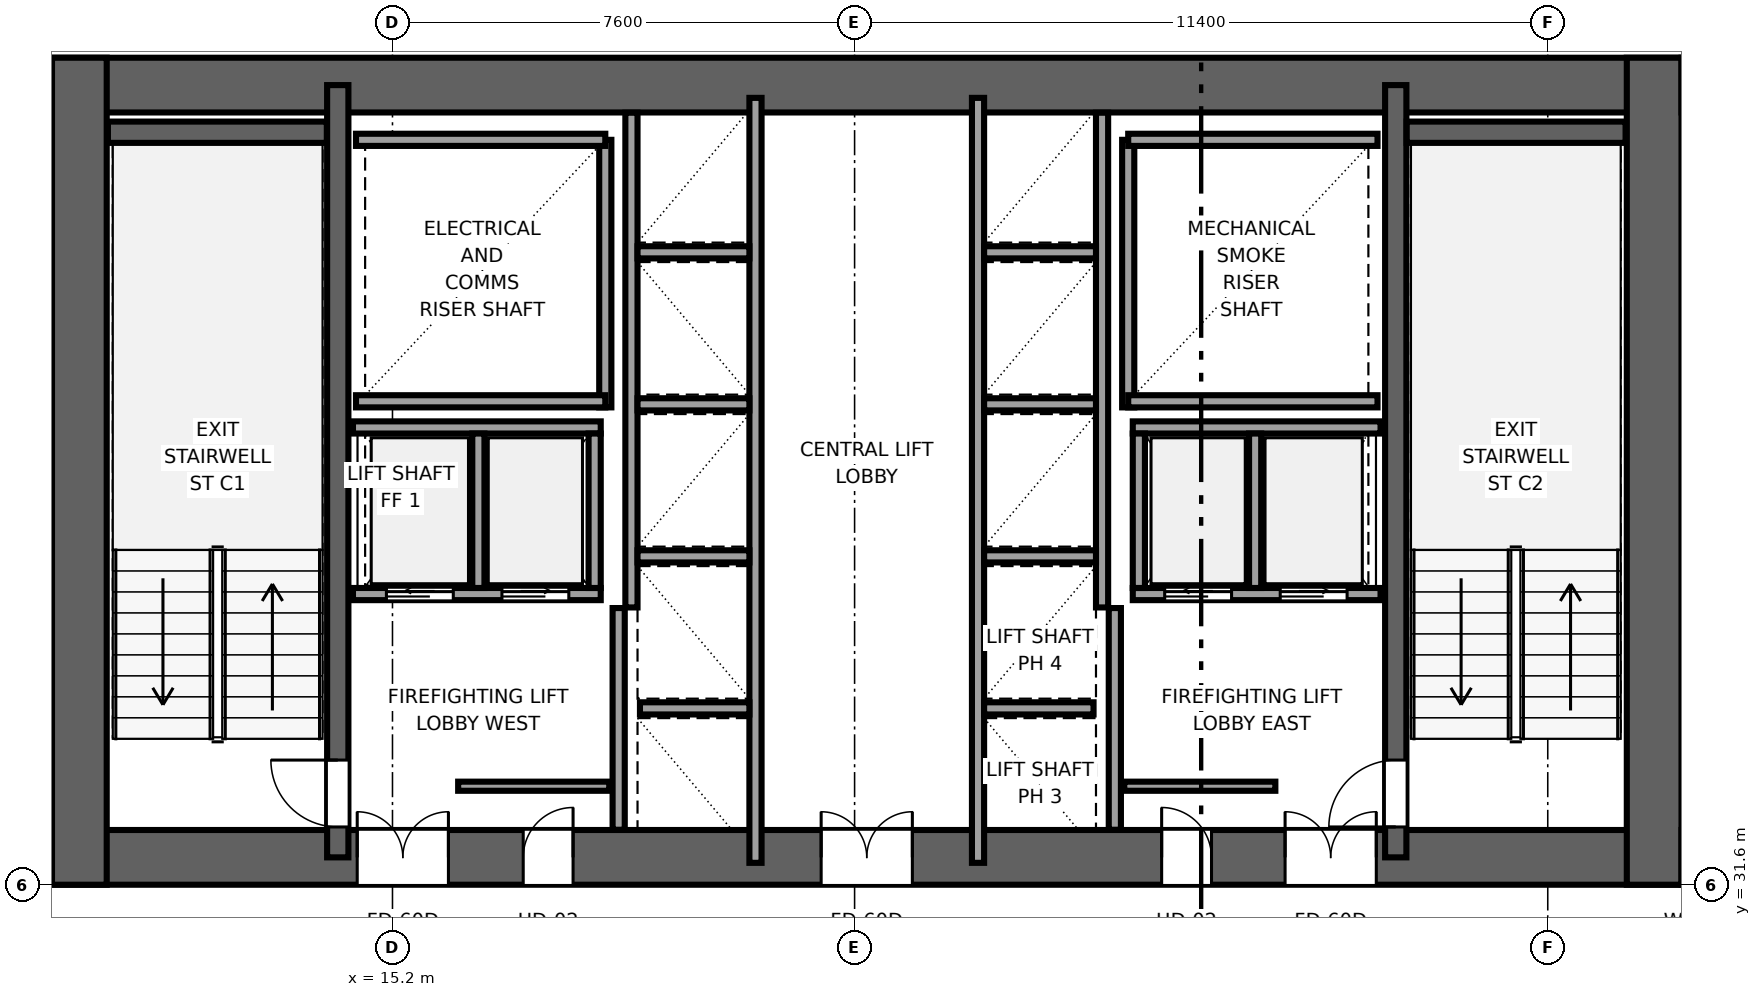
"""IFC4 building model, lengths in metres.
Left out: names, types, materials, properties, quantities, classifications, styles, units other than length and angle.
Written with IfcOpenShell. Run it as: python <this file> out.ifc"""

import sys

from ifc_helpers import new_model, si_unit, direction, frame, frame_2d, origin, place, context, subcontext, project, spatial, rectangle, extrude, source, transform, mapped, element, fill, save


model = new_model("IFC4")
c1 = context("Model", 3, precision=1e-05, world=origin(), true_north=direction((0.0, 1.0)))
c2 = subcontext(c1, "Body", "Model", "MODEL_VIEW")
j1 = project(units=[si_unit("LENGTHUNIT", "METRE"), si_unit("PLANEANGLEUNIT", "RADIAN")], contexts=[c1])
p1 = place(None, origin())
s1 = spatial("IfcSite", under=j1, at=p1, CompositionType="ELEMENT")
p2 = place(p1, origin())
s2 = spatial("IfcBuilding", under=s1, at=p2, CompositionType="ELEMENT")
p3 = place(p2, frame((0.0, 0.0, 39.1)))
s3 = spatial("IfcBuildingStorey", under=s2, at=p3, CompositionType="ELEMENT", Elevation=39.1)
p4 = place(p3, frame((9.6, 32.05, 0.0), z_axis=(0.0, 0.0, 1.0), x_axis=(1.0, 0.0, 0.0)))
e1 = element("IfcWall", 1, at=p4, inside=s3, PredefinedType="SHEAR", context=c2, shape_type="SweptSolid", body=[
    extrude(rectangle(XDim=26.8, YDim=0.9, at=frame_2d((13.4, 0.0))), origin(), (0.0, 0.0, 1.0), 3.55),
])
p5 = place(p4, frame((6.52, 0.0, 0.0), z_axis=(0.0, 0.0, 1.0), x_axis=(-1.0, 0.0, 0.0)))
e2 = element("IfcOpeningElement", 2, at=p5, cuts=e1, PredefinedType="OPENING", context=c2, shape_type="SweptSolid", body=[
    extrude(rectangle(XDim=1.5, YDim=2.04, at=frame_2d((0.75, 1.02))), frame((0.0, 0.46, 0.0), z_axis=(0.0, -1.0, 0.0), x_axis=(1.0, 0.0, 0.0)), (0.0, 0.0, 1.0), 0.92),
])
p6 = place(p4, frame((14.15, 0.0, 0.0), z_axis=(0.0, 0.0, 1.0), x_axis=(-1.0, 0.0, 0.0)))
e3 = element("IfcOpeningElement", 3, at=p6, cuts=e1, PredefinedType="OPENING", context=c2, shape_type="SweptSolid", body=[
    extrude(rectangle(XDim=1.5, YDim=2.04, at=frame_2d((0.75, 1.02))), frame((0.0, 0.46, 0.0), z_axis=(0.0, -1.0, 0.0), x_axis=(1.0, 0.0, 0.0)), (0.0, 0.0, 1.0), 0.92),
])
p7 = place(p4, frame((21.78, 0.0, 0.0), z_axis=(0.0, 0.0, 1.0), x_axis=(-1.0, 0.0, 0.0)))
e4 = element("IfcOpeningElement", 4, at=p7, cuts=e1, PredefinedType="OPENING", context=c2, shape_type="SweptSolid", body=[
    extrude(rectangle(XDim=1.5, YDim=2.04, at=frame_2d((0.75, 1.02))), frame((0.0, 0.46, 0.0), z_axis=(0.0, -1.0, 0.0), x_axis=(1.0, 0.0, 0.0)), (0.0, 0.0, 1.0), 0.92),
])
p8 = place(p4, frame((8.57, 0.0, 0.0), z_axis=(0.0, 0.0, 1.0), x_axis=(-1.0, 0.0, 0.0)))
e5 = element("IfcOpeningElement", 5, at=p8, cuts=e1, PredefinedType="OPENING", context=c2, shape_type="SweptSolid", body=[
    extrude(rectangle(XDim=0.82, YDim=2.01, at=frame_2d((0.41, 1.005))), frame((0.0, 0.46, 0.0), z_axis=(0.0, -1.0, 0.0), x_axis=(1.0, 0.0, 0.0)), (0.0, 0.0, 1.0), 0.92),
])
p9 = place(p4, frame((19.07, 0.0, 0.0), z_axis=(0.0, 0.0, 1.0), x_axis=(-1.0, 0.0, 0.0)))
e6 = element("IfcOpeningElement", 6, at=p9, cuts=e1, PredefinedType="OPENING", context=c2, shape_type="SweptSolid", body=[
    extrude(rectangle(XDim=0.82, YDim=2.01, at=frame_2d((0.41, 1.005))), frame((0.0, 0.46, 0.0), z_axis=(0.0, -1.0, 0.0), x_axis=(1.0, 0.0, 0.0)), (0.0, 0.0, 1.0), 0.92),
])
p10 = place(p3, frame((9.6, 44.75, 0.0), z_axis=(0.0, 0.0, 1.0), x_axis=(1.0, 0.0, 0.0)))
e7 = element("IfcWall", 7, at=p10, inside=s3, PredefinedType="SHEAR", context=c2, shape_type="SweptSolid", body=[
    extrude(rectangle(XDim=26.8, YDim=0.9, at=frame_2d((13.4, 0.0))), origin(), (0.0, 0.0, 1.0), 3.55),
])
for number, where, z_axis, x_axis in (
    (8, (10.05, 31.6, 0.0), (0.0, 0.0, 1.0), (0.0, 1.0, 0.0)),
    (9, (35.95, 31.6, 0.0), (0.0, 0.0, 1.0), (0.0, 1.0, 0.0)),
):
    element("IfcWall", number, at=place(p3, frame(where, z_axis=z_axis, x_axis=x_axis)), inside=s3, PredefinedType="SHEAR", context=c2, shape_type="SweptSolid", body=[
        extrude(rectangle(XDim=13.6, YDim=0.9, at=frame_2d((6.8, 0.0))), origin(), (0.0, 0.0, 1.0), 3.55),
    ])
p11 = place(p3, frame((14.3, 32.05, 0.0), z_axis=(0.0, 0.0, 1.0), x_axis=(0.0, 1.0, 0.0)))
e10 = element("IfcWall", 10, at=p11, inside=s3, PredefinedType="SHEAR", context=c2, shape_type="SweptSolid", body=[
    extrude(rectangle(XDim=12.7, YDim=0.35, at=frame_2d((6.35, 0.0))), origin(), (0.0, 0.0, 1.0), 3.55),
])
p12 = place(p11, frame((0.5, 0.0, 0.0)))
e11 = element("IfcOpeningElement", 11, at=p12, cuts=e10, PredefinedType="OPENING", context=c2, shape_type="SweptSolid", body=[
    extrude(rectangle(XDim=1.1, YDim=2.12, at=frame_2d((0.55, 1.06))), frame((0.0, 0.185, 0.0), z_axis=(0.0, -1.0, 0.0), x_axis=(1.0, 0.0, 0.0)), (0.0, 0.0, 1.0), 0.37),
])
p13 = place(p3, frame((31.7, 32.05, 0.0), z_axis=(0.0, 0.0, 1.0), x_axis=(0.0, 1.0, 0.0)))
e12 = element("IfcWall", 12, at=p13, inside=s3, PredefinedType="SHEAR", context=c2, shape_type="SweptSolid", body=[
    extrude(rectangle(XDim=12.7, YDim=0.35, at=frame_2d((6.35, 0.0))), origin(), (0.0, 0.0, 1.0), 3.55),
])
p14 = place(p13, frame((1.6, 0.0, 0.0), z_axis=(0.0, 0.0, 1.0), x_axis=(-1.0, 0.0, 0.0)))
e13 = element("IfcOpeningElement", 13, at=p14, cuts=e12, PredefinedType="OPENING", context=c2, shape_type="SweptSolid", body=[
    extrude(rectangle(XDim=1.1, YDim=2.12, at=frame_2d((0.55, 1.06))), frame((0.0, 0.185, 0.0), z_axis=(0.0, -1.0, 0.0), x_axis=(1.0, 0.0, 0.0)), (0.0, 0.0, 1.0), 0.37),
])
for number, where, z_axis, x_axis in (
    (14, (10.52, 43.975, 0.0), (0.0, 0.0, 1.0), (1.0, 0.0, 0.0)),
    (15, (31.88, 43.975, 0.0), (0.0, 0.0, 1.0), (1.0, 0.0, 0.0)),
):
    element("IfcWall", number, at=place(p3, frame(where, z_axis=z_axis, x_axis=x_axis)), inside=s3, PredefinedType="SHEAR", context=c2, shape_type="SweptSolid", body=[
        extrude(rectangle(XDim=3.6, YDim=0.35, at=frame_2d((1.8, 0.0))), origin(), (0.0, 0.0, 1.0), 3.55),
    ])
p15 = place(p3, frame((18.7, 39.45, 0.0), z_axis=(0.0, 0.0, 1.0), x_axis=(0.0, 1.0, 0.0)))
e16 = element("IfcWall", 16, at=p15, inside=s3, PredefinedType="SOLIDWALL", context=c2, shape_type="SweptSolid", body=[
    extrude(rectangle(XDim=4.4, YDim=0.2, at=frame_2d((2.2, 0.0))), origin(), (0.0, 0.0, 1.0), 3.37),
])
for number, where, z_axis, x_axis in (
    (17, (14.6, 39.55, 0.0), (0.0, 0.0, 1.0), (1.0, 0.0, 0.0)),
    (18, (14.6, 43.85, 0.0), (0.0, 0.0, 1.0), (1.0, 0.0, 0.0)),
):
    element("IfcWall", number, at=place(p3, frame(where, z_axis=z_axis, x_axis=x_axis)), inside=s3, PredefinedType="SOLIDWALL", context=c2, shape_type="SweptSolid", body=[
        extrude(rectangle(XDim=4.1, YDim=0.2, at=frame_2d((2.05, 0.0))), origin(), (0.0, 0.0, 1.0), 3.37),
    ])
p16 = place(p3, frame((27.3, 39.45, 0.0), z_axis=(0.0, 0.0, 1.0), x_axis=(0.0, 1.0, 0.0)))
e19 = element("IfcWall", 19, at=p16, inside=s3, PredefinedType="SOLIDWALL", context=c2, shape_type="SweptSolid", body=[
    extrude(rectangle(XDim=4.4, YDim=0.2, at=frame_2d((2.2, 0.0))), origin(), (0.0, 0.0, 1.0), 3.37),
])
for number, where, z_axis, x_axis in (
    (20, (27.3, 39.55, 0.0), (0.0, 0.0, 1.0), (1.0, 0.0, 0.0)),
    (21, (27.3, 43.85, 0.0), (0.0, 0.0, 1.0), (1.0, 0.0, 0.0)),
):
    element("IfcWall", number, at=place(p3, frame(where, z_axis=z_axis, x_axis=x_axis)), inside=s3, PredefinedType="SOLIDWALL", context=c2, shape_type="SweptSolid", body=[
        extrude(rectangle(XDim=4.1, YDim=0.2, at=frame_2d((2.05, 0.0))), origin(), (0.0, 0.0, 1.0), 3.37),
    ])
for number, where, z_axis, x_axis in (
    (22, (18.92, 32.504, 0.0), (0.0, 0.0, 1.0), (0.0, 1.0, 0.0)),
    (23, (27.08, 32.504, 0.0), (0.0, 0.0, 1.0), (0.0, 1.0, 0.0)),
):
    element("IfcWall", number, at=place(p3, frame(where, z_axis=z_axis, x_axis=x_axis)), inside=s3, PredefinedType="SOLIDWALL", context=c2, shape_type="SweptSolid", body=[
        extrude(rectangle(XDim=3.646, YDim=0.2, at=frame_2d((1.823, 0.0))), origin(), (0.0, 0.0, 1.0), 3.37),
    ])
p17 = place(p3, frame((21.17, 31.96, 0.0), z_axis=(0.0, 0.0, 1.0), x_axis=(0.0, 1.0, 0.0)))
e24 = element("IfcWall", 24, at=p17, inside=s3, PredefinedType="SOLIDWALL", context=c2, shape_type="SweptSolid", body=[
    extrude(rectangle(XDim=12.58, YDim=0.2, at=frame_2d((6.29, 0.0))), origin(), (0.0, 0.0, 1.0), 3.37),
])
p18 = place(p3, frame((19.13, 36.16, 0.0), z_axis=(0.0, 0.0, 1.0), x_axis=(0.0, 1.0, 0.0)))
e25 = element("IfcWall", 25, at=p18, inside=s3, PredefinedType="SOLIDWALL", context=c2, shape_type="SweptSolid", body=[
    extrude(rectangle(XDim=8.136, YDim=0.2, at=frame_2d((4.068, 0.0))), origin(), (0.0, 0.0, 1.0), 3.37),
])
p19 = place(p3, frame((19.27, 34.5, 0.0), z_axis=(0.0, 0.0, 1.0), x_axis=(1.0, 0.0, 0.0)))
e26 = element("IfcWall", 26, at=p19, inside=s3, PredefinedType="SOLIDWALL", context=c2, shape_type="SweptSolid", body=[
    extrude(rectangle(XDim=1.8, YDim=0.2, at=frame_2d((0.9, 0.0))), origin(), (0.0, 0.0, 1.0), 3.37),
])
for number, where, z_axis, x_axis in (
    (27, (19.23, 37.0, 0.0), (0.0, 0.0, 1.0), (1.0, 0.0, 0.0)),
    (28, (19.23, 39.5, 0.0), (0.0, 0.0, 1.0), (1.0, 0.0, 0.0)),
    (29, (19.23, 42.0, 0.0), (0.0, 0.0, 1.0), (1.0, 0.0, 0.0)),
):
    element("IfcWall", number, at=place(p3, frame(where, z_axis=z_axis, x_axis=x_axis)), inside=s3, PredefinedType="SOLIDWALL", context=c2, shape_type="SweptSolid", body=[
        extrude(rectangle(XDim=1.84, YDim=0.2, at=frame_2d((0.92, 0.0))), origin(), (0.0, 0.0, 1.0), 3.37),
    ])
p20 = place(p3, frame((27.375, 36.38, 0.0), z_axis=(0.0, 0.0, 1.0), x_axis=(1.0, 0.0, 0.0)))
e30 = element("IfcWall", 30, at=p20, inside=s3, PredefinedType="SOLIDWALL", context=c2, shape_type="SweptSolid", body=[
    extrude(rectangle(XDim=4.075, YDim=0.2, at=frame_2d((2.038, 0.0))), origin(), (0.0, 0.0, 1.0), 3.37),
])
p21 = place(p20, frame((0.525, 0.0, 0.0)))
e31 = element("IfcOpeningElement", 31, at=p21, cuts=e30, PredefinedType="OPENING", context=c2, shape_type="SweptSolid", body=[
    extrude(rectangle(XDim=1.1, YDim=2.12, at=frame_2d((0.55, 1.06))), frame((0.0, 0.11, 0.0), z_axis=(0.0, -1.0, 0.0), x_axis=(1.0, 0.0, 0.0)), (0.0, 0.0, 1.0), 0.22),
])
p22 = place(p20, frame((2.425, 0.0, 0.0)))
e32 = element("IfcOpeningElement", 32, at=p22, cuts=e30, PredefinedType="OPENING", context=c2, shape_type="SweptSolid", body=[
    extrude(rectangle(XDim=1.1, YDim=2.12, at=frame_2d((0.55, 1.06))), frame((0.0, 0.11, 0.0), z_axis=(0.0, -1.0, 0.0), x_axis=(1.0, 0.0, 0.0)), (0.0, 0.0, 1.0), 0.22),
])
p23 = place(p3, frame((27.375, 39.12, 0.0), z_axis=(0.0, 0.0, 1.0), x_axis=(1.0, 0.0, 0.0)))
e33 = element("IfcWall", 33, at=p23, inside=s3, PredefinedType="SOLIDWALL", context=c2, shape_type="SweptSolid", body=[
    extrude(rectangle(XDim=4.075, YDim=0.2, at=frame_2d((2.038, 0.0))), origin(), (0.0, 0.0, 1.0), 3.37),
])
for number, where, z_axis, x_axis in (
    (34, (27.475, 36.48, 0.0), (0.0, 0.0, 1.0), (0.0, 1.0, 0.0)),
    (35, (29.387, 36.48, 0.0), (0.0, 0.0, 1.0), (0.0, 1.0, 0.0)),
):
    element("IfcWall", number, at=place(p3, frame(where, z_axis=z_axis, x_axis=x_axis)), inside=s3, PredefinedType="SOLIDWALL", context=c2, shape_type="SweptSolid", body=[
        extrude(rectangle(XDim=2.54, YDim=0.2, at=frame_2d((1.27, 0.0))), origin(), (0.0, 0.0, 1.0), 3.37),
    ])
p24 = place(p3, frame((14.55, 36.38, 0.0), z_axis=(0.0, 0.0, 1.0), x_axis=(1.0, 0.0, 0.0)))
e36 = element("IfcWall", 36, at=p24, inside=s3, PredefinedType="SOLIDWALL", context=c2, shape_type="SweptSolid", body=[
    extrude(rectangle(XDim=4.075, YDim=0.2, at=frame_2d((2.038, 0.0))), origin(), (0.0, 0.0, 1.0), 3.37),
])
p25 = place(p24, frame((0.55, 0.0, 0.0)))
e37 = element("IfcOpeningElement", 37, at=p25, cuts=e36, PredefinedType="OPENING", context=c2, shape_type="SweptSolid", body=[
    extrude(rectangle(XDim=1.1, YDim=2.12, at=frame_2d((0.55, 1.06))), frame((0.0, 0.11, 0.0), z_axis=(0.0, -1.0, 0.0), x_axis=(1.0, 0.0, 0.0)), (0.0, 0.0, 1.0), 0.22),
])
p26 = place(p24, frame((2.45, 0.0, 0.0)))
e38 = element("IfcOpeningElement", 38, at=p26, cuts=e36, PredefinedType="OPENING", context=c2, shape_type="SweptSolid", body=[
    extrude(rectangle(XDim=1.1, YDim=2.12, at=frame_2d((0.55, 1.06))), frame((0.0, 0.11, 0.0), z_axis=(0.0, -1.0, 0.0), x_axis=(1.0, 0.0, 0.0)), (0.0, 0.0, 1.0), 0.22),
])
p27 = place(p3, frame((14.55, 39.12, 0.0), z_axis=(0.0, 0.0, 1.0), x_axis=(1.0, 0.0, 0.0)))
e39 = element("IfcWall", 39, at=p27, inside=s3, PredefinedType="SOLIDWALL", context=c2, shape_type="SweptSolid", body=[
    extrude(rectangle(XDim=4.075, YDim=0.2, at=frame_2d((2.038, 0.0))), origin(), (0.0, 0.0, 1.0), 3.37),
])
for number, where, z_axis, x_axis in (
    (40, (18.525, 36.48, 0.0), (0.0, 0.0, 1.0), (0.0, 1.0, 0.0)),
    (41, (16.613, 36.48, 0.0), (0.0, 0.0, 1.0), (0.0, 1.0, 0.0)),
):
    element("IfcWall", number, at=place(p3, frame(where, z_axis=z_axis, x_axis=x_axis)), inside=s3, PredefinedType="SOLIDWALL", context=c2, shape_type="SweptSolid", body=[
        extrude(rectangle(XDim=2.54, YDim=0.2, at=frame_2d((1.27, 0.0))), origin(), (0.0, 0.0, 1.0), 3.37),
    ])
p28 = place(p3, frame((24.83, 31.96, 0.0), z_axis=(0.0, 0.0, 1.0), x_axis=(0.0, 1.0, 0.0)))
e42 = element("IfcWall", 42, at=p28, inside=s3, PredefinedType="SOLIDWALL", context=c2, shape_type="SweptSolid", body=[
    extrude(rectangle(XDim=12.58, YDim=0.2, at=frame_2d((6.29, 0.0))), origin(), (0.0, 0.0, 1.0), 3.37),
])
p29 = place(p3, frame((26.87, 36.16, 0.0), z_axis=(0.0, 0.0, 1.0), x_axis=(0.0, 1.0, 0.0)))
e43 = element("IfcWall", 43, at=p29, inside=s3, PredefinedType="SOLIDWALL", context=c2, shape_type="SweptSolid", body=[
    extrude(rectangle(XDim=8.136, YDim=0.2, at=frame_2d((4.068, 0.0))), origin(), (0.0, 0.0, 1.0), 3.37),
])
p30 = place(p3, frame((24.93, 34.5, 0.0), z_axis=(0.0, 0.0, 1.0), x_axis=(1.0, 0.0, 0.0)))
e44 = element("IfcWall", 44, at=p30, inside=s3, PredefinedType="SOLIDWALL", context=c2, shape_type="SweptSolid", body=[
    extrude(rectangle(XDim=1.8, YDim=0.2, at=frame_2d((0.9, 0.0))), origin(), (0.0, 0.0, 1.0), 3.37),
])
for number, where, z_axis, x_axis in (
    (45, (24.93, 37.0, 0.0), (0.0, 0.0, 1.0), (1.0, 0.0, 0.0)),
    (46, (24.93, 39.5, 0.0), (0.0, 0.0, 1.0), (1.0, 0.0, 0.0)),
    (47, (24.93, 42.0, 0.0), (0.0, 0.0, 1.0), (1.0, 0.0, 0.0)),
):
    element("IfcWall", number, at=place(p3, frame(where, z_axis=z_axis, x_axis=x_axis)), inside=s3, PredefinedType="SOLIDWALL", context=c2, shape_type="SweptSolid", body=[
        extrude(rectangle(XDim=1.84, YDim=0.2, at=frame_2d((0.92, 0.0))), origin(), (0.0, 0.0, 1.0), 3.37),
    ])
for number, where, z_axis, x_axis in (
    (48, (16.28, 33.22, 0.0), (0.0, 0.0, 1.0), (1.0, 0.0, 0.0)),
    (49, (27.235, 33.22, 0.0), (0.0, 0.0, 1.0), (1.0, 0.0, 0.0)),
):
    element("IfcWall", number, at=place(p3, frame(where, z_axis=z_axis, x_axis=x_axis)), inside=s3, PredefinedType="PARTITIONING", context=c2, shape_type="SweptSolid", body=[
        extrude(rectangle(XDim=2.485, YDim=0.15, at=frame_2d((1.242, 0.0))), origin(), (0.0, 0.0, 1.0), 3.37),
    ])
m1 = source(origin(), c2, "Body", "SweptSolid", [
    extrude(rectangle(XDim=1.1, YDim=2.12, at=frame_2d((0.55, 1.06))), frame((0.0, 0.025, 0.0), z_axis=(0.0, -1.0, 0.0), x_axis=(1.0, 0.0, 0.0)), (0.0, 0.0, 1.0), 0.05),
])
p31 = place(p12, origin())
e50 = element("IfcDoor", 50, at=p31, inside=s3, OperationType="SINGLE_SWING_RIGHT", PredefinedType="DOOR", context=c2, shape_type="MappedRepresentation", body=[
    mapped(m1, transform((0.0, 0.0, 0.0), x_axis=(1.0, 0.0, 0.0), y_axis=(0.0, 1.0, 0.0), z_axis=(0.0, 0.0, 1.0), scale=1.0)),
])
fill(e11, e50)
p32 = place(p14, origin())
e51 = element("IfcDoor", 51, at=p32, inside=s3, OperationType="SINGLE_SWING_LEFT", PredefinedType="DOOR", context=c2, shape_type="MappedRepresentation", body=[
    mapped(m1, transform((0.0, 0.0, 0.0), x_axis=(1.0, 0.0, 0.0), y_axis=(0.0, 1.0, 0.0), z_axis=(0.0, 0.0, 1.0), scale=1.0)),
])
fill(e13, e51)
m2 = source(origin(), c2, "Body", "SweptSolid", [
    extrude(rectangle(XDim=1.5, YDim=2.04, at=frame_2d((0.75, 1.02))), frame((0.0, 0.025, 0.0), z_axis=(0.0, -1.0, 0.0), x_axis=(1.0, 0.0, 0.0)), (0.0, 0.0, 1.0), 0.05),
])
p33 = place(p5, origin())
e52 = element("IfcDoor", 52, at=p33, inside=s3, OperationType="DOUBLE_DOOR_SINGLE_SWING", PredefinedType="DOOR", context=c2, shape_type="MappedRepresentation", body=[
    mapped(m2, transform((0.0, 0.0, 0.0), x_axis=(1.0, 0.0, 0.0), y_axis=(0.0, 1.0, 0.0), z_axis=(0.0, 0.0, 1.0), scale=1.0)),
])
fill(e2, e52)
p34 = place(p6, origin())
e53 = element("IfcDoor", 53, at=p34, inside=s3, OperationType="DOUBLE_DOOR_SINGLE_SWING", PredefinedType="DOOR", context=c2, shape_type="MappedRepresentation", body=[
    mapped(m2, transform((0.0, 0.0, 0.0), x_axis=(1.0, 0.0, 0.0), y_axis=(0.0, 1.0, 0.0), z_axis=(0.0, 0.0, 1.0), scale=1.0)),
])
fill(e3, e53)
p35 = place(p7, origin())
e54 = element("IfcDoor", 54, at=p35, inside=s3, OperationType="DOUBLE_DOOR_SINGLE_SWING", PredefinedType="DOOR", context=c2, shape_type="MappedRepresentation", body=[
    mapped(m2, transform((0.0, 0.0, 0.0), x_axis=(1.0, 0.0, 0.0), y_axis=(0.0, 1.0, 0.0), z_axis=(0.0, 0.0, 1.0), scale=1.0)),
])
fill(e4, e54)
m3 = source(origin(), c2, "Body", "SweptSolid", [
    extrude(rectangle(XDim=0.82, YDim=2.01, at=frame_2d((0.41, 1.005))), frame((0.0, 0.025, 0.0), z_axis=(0.0, -1.0, 0.0), x_axis=(1.0, 0.0, 0.0)), (0.0, 0.0, 1.0), 0.05),
])
p36 = place(p8, origin())
e55 = element("IfcDoor", 55, at=p36, inside=s3, OperationType="SINGLE_SWING_RIGHT", PredefinedType="DOOR", context=c2, shape_type="MappedRepresentation", body=[
    mapped(m3, transform((0.0, 0.0, 0.0), x_axis=(1.0, 0.0, 0.0), y_axis=(0.0, 1.0, 0.0), z_axis=(0.0, 0.0, 1.0), scale=1.0)),
])
fill(e5, e55)
p37 = place(p9, origin())
e56 = element("IfcDoor", 56, at=p37, inside=s3, OperationType="SINGLE_SWING_LEFT", PredefinedType="DOOR", context=c2, shape_type="MappedRepresentation", body=[
    mapped(m3, transform((0.0, 0.0, 0.0), x_axis=(1.0, 0.0, 0.0), y_axis=(0.0, 1.0, 0.0), z_axis=(0.0, 0.0, 1.0), scale=1.0)),
])
fill(e6, e56)
m4 = source(origin(), c2, "Body", "SweptSolid", [
    extrude(rectangle(XDim=1.1, YDim=2.12, at=frame_2d((0.55, 1.06))), frame((0.0, 0.025, 0.0), z_axis=(0.0, -1.0, 0.0), x_axis=(1.0, 0.0, 0.0)), (0.0, 0.0, 1.0), 0.05),
])
p38 = place(p21, origin())
e57 = element("IfcDoor", 57, at=p38, inside=s3, OperationType="SLIDING_TO_LEFT", PredefinedType="DOOR", context=c2, shape_type="MappedRepresentation", body=[
    mapped(m4, transform((0.0, 0.0, 0.0), x_axis=(1.0, 0.0, 0.0), y_axis=(0.0, 1.0, 0.0), z_axis=(0.0, 0.0, 1.0), scale=1.0)),
])
fill(e31, e57)
p39 = place(p22, origin())
e58 = element("IfcDoor", 58, at=p39, inside=s3, OperationType="SLIDING_TO_RIGHT", PredefinedType="DOOR", context=c2, shape_type="MappedRepresentation", body=[
    mapped(m4, transform((0.0, 0.0, 0.0), x_axis=(1.0, 0.0, 0.0), y_axis=(0.0, 1.0, 0.0), z_axis=(0.0, 0.0, 1.0), scale=1.0)),
])
fill(e32, e58)
p40 = place(p25, origin())
e59 = element("IfcDoor", 59, at=p40, inside=s3, OperationType="SLIDING_TO_LEFT", PredefinedType="DOOR", context=c2, shape_type="MappedRepresentation", body=[
    mapped(m4, transform((0.0, 0.0, 0.0), x_axis=(1.0, 0.0, 0.0), y_axis=(0.0, 1.0, 0.0), z_axis=(0.0, 0.0, 1.0), scale=1.0)),
])
fill(e37, e59)
p41 = place(p26, origin())
e60 = element("IfcDoor", 60, at=p41, inside=s3, OperationType="SLIDING_TO_RIGHT", PredefinedType="DOOR", context=c2, shape_type="MappedRepresentation", body=[
    mapped(m4, transform((0.0, 0.0, 0.0), x_axis=(1.0, 0.0, 0.0), y_axis=(0.0, 1.0, 0.0), z_axis=(0.0, 0.0, 1.0), scale=1.0)),
])
fill(e38, e60)
save(model, sys.argv[1])
